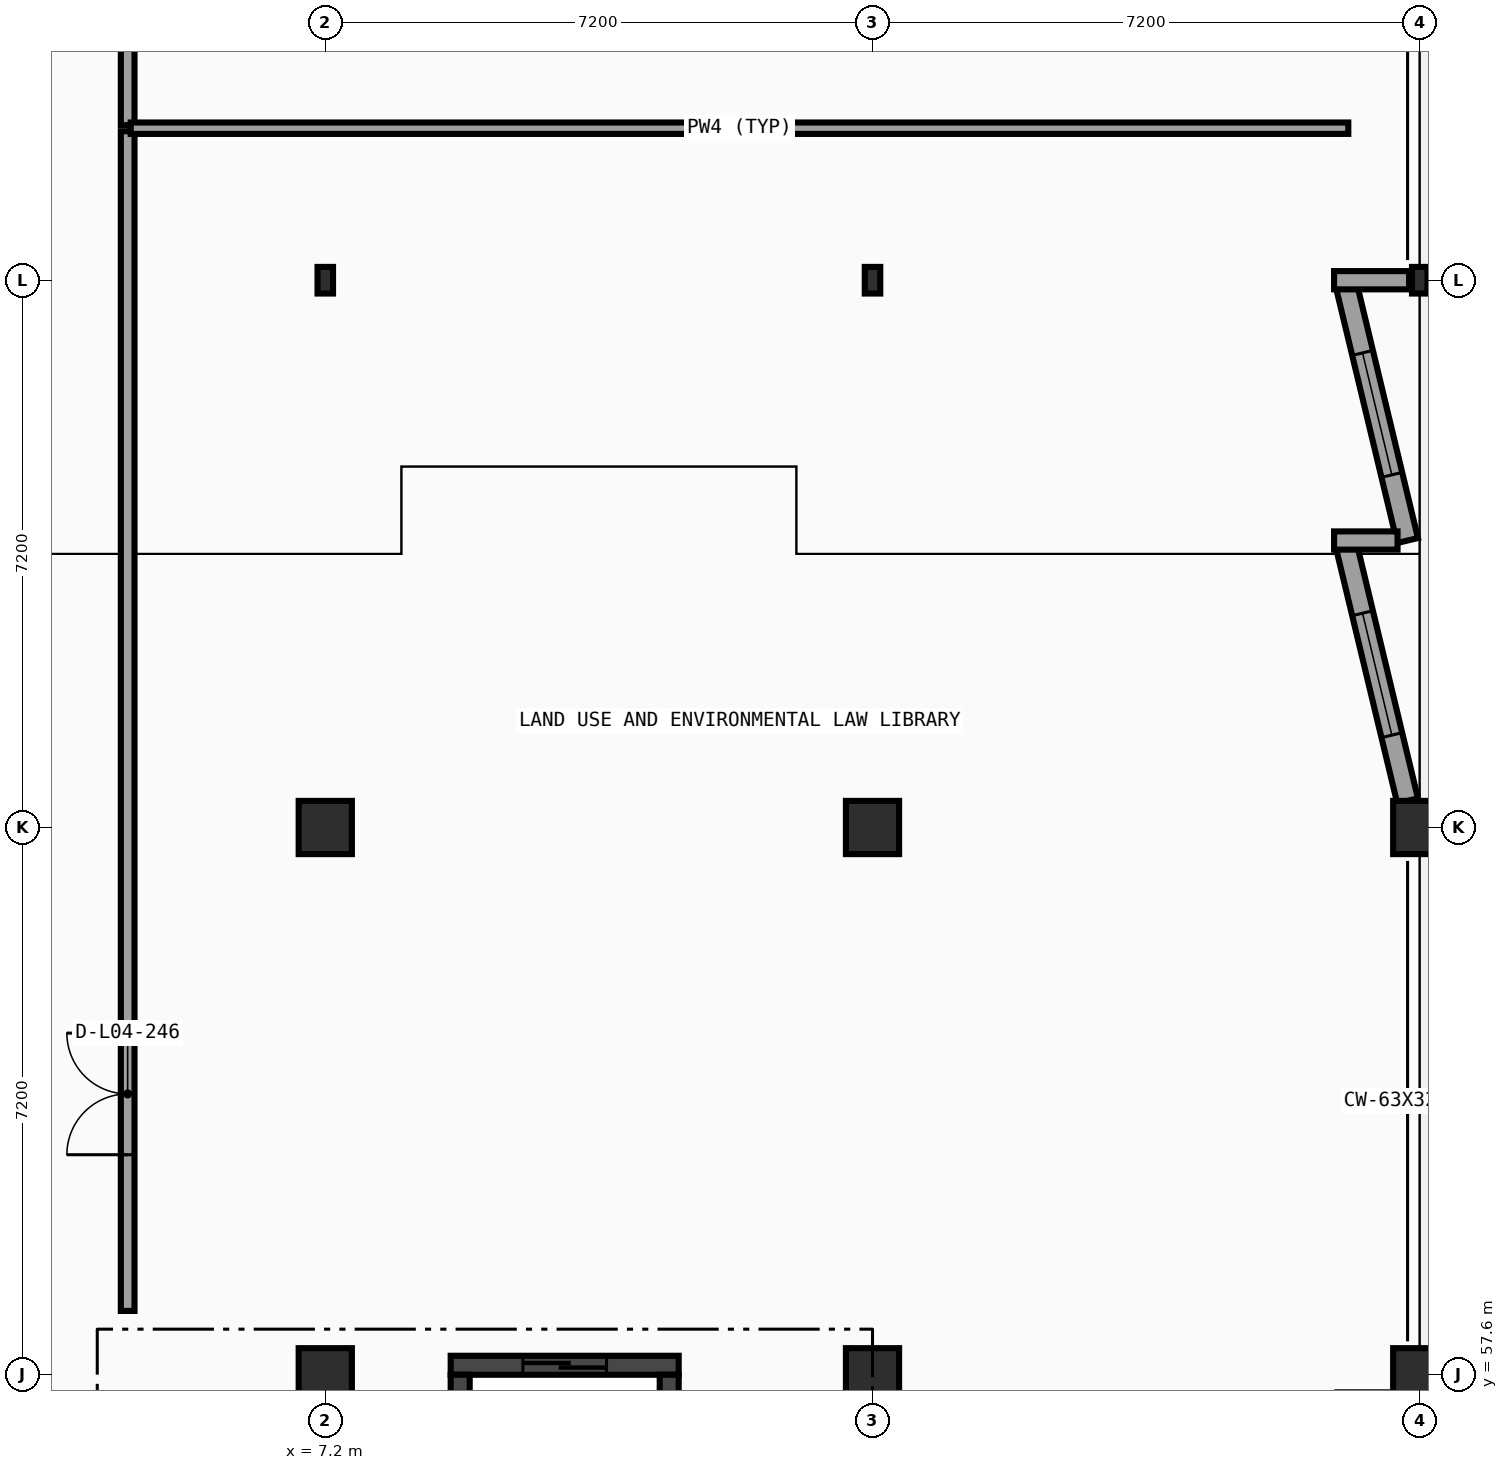
"""IFC4 building model, lengths in metres.
Left out: names, types, materials, properties, quantities, classifications, styles, units other than length and angle.
Written with IfcOpenShell. Run it as: python <this file> out.ifc"""

import sys

from ifc_helpers import new_model, si_unit, direction, frame, frame_2d, origin, origin_2d, place, context, subcontext, project, spatial, rectangle, i_section, extrude, element, fill, save


model = new_model("IFC4")
c1 = context("Model", 3, precision=1e-05, world=origin(), true_north=direction((0.0, 1.0)))
c2 = subcontext(c1, "Body", "Model", "MODEL_VIEW")
j1 = project(units=[si_unit("LENGTHUNIT", "METRE"), si_unit("PLANEANGLEUNIT", "RADIAN")], contexts=[c1])
p1 = place(None, origin())
s1 = spatial("IfcSite", under=j1, at=p1, CompositionType="ELEMENT")
p2 = place(p1, origin())
s2 = spatial("IfcBuilding", under=s1, at=p2, CompositionType="ELEMENT")
p3 = place(p2, frame((0.0, 0.0, 18.9)))
s3 = spatial("IfcBuildingStorey", under=s2, at=p3, CompositionType="ELEMENT", Elevation=18.9)
for number, where, z_axis, x_axis in (
    (1, (7.2, 57.6, 0.0), (0.0, 0.0, 1.0), (1.0, 0.0, 0.0)),
    (2, (7.2, 64.8, 0.0), (0.0, 0.0, 1.0), (1.0, 0.0, 0.0)),
):
    element("IfcColumn", number, at=place(p3, frame(where, z_axis=z_axis, x_axis=x_axis)), inside=s3, PredefinedType="COLUMN", context=c2, shape_type="SweptSolid", body=[
        extrude(rectangle(XDim=0.7, YDim=0.7, at=origin_2d()), origin(), (0.0, 0.0, 1.0), 4.05),
    ])
p4 = place(p3, frame((7.2, 72.0, 0.0), z_axis=(0.0, 0.0, 1.0), x_axis=(1.0, 0.0, 0.0)))
e3 = element("IfcColumn", 3, at=p4, inside=s3, PredefinedType="COLUMN", context=c2, shape_type="SweptSolid", body=[
    extrude(i_section(OverallWidth=0.204, OverallDepth=0.35, WebThickness=0.009, FlangeThickness=0.015, FilletRadius=0.015, at=origin_2d()), origin(), (0.0, 0.0, 1.0), 4.05),
])
for number, where, z_axis, x_axis in (
    (4, (14.4, 57.6, 0.0), (0.0, 0.0, 1.0), (1.0, 0.0, 0.0)),
    (5, (14.4, 64.8, 0.0), (0.0, 0.0, 1.0), (1.0, 0.0, 0.0)),
):
    element("IfcColumn", number, at=place(p3, frame(where, z_axis=z_axis, x_axis=x_axis)), inside=s3, PredefinedType="COLUMN", context=c2, shape_type="SweptSolid", body=[
        extrude(rectangle(XDim=0.7, YDim=0.7, at=origin_2d()), origin(), (0.0, 0.0, 1.0), 4.05),
    ])
p5 = place(p3, frame((14.4, 72.0, 0.0), z_axis=(0.0, 0.0, 1.0), x_axis=(1.0, 0.0, 0.0)))
e6 = element("IfcColumn", 6, at=p5, inside=s3, PredefinedType="COLUMN", context=c2, shape_type="SweptSolid", body=[
    extrude(i_section(OverallWidth=0.204, OverallDepth=0.35, WebThickness=0.009, FlangeThickness=0.015, FilletRadius=0.015, at=origin_2d()), origin(), (0.0, 0.0, 1.0), 4.05),
])
for number, where, z_axis, x_axis in (
    (7, (21.6, 57.6, 0.0), (0.0, 0.0, 1.0), (1.0, 0.0, 0.0)),
    (8, (21.6, 64.8, 0.0), (0.0, 0.0, 1.0), (1.0, 0.0, 0.0)),
):
    element("IfcColumn", number, at=place(p3, frame(where, z_axis=z_axis, x_axis=x_axis)), inside=s3, PredefinedType="COLUMN", context=c2, shape_type="SweptSolid", body=[
        extrude(rectangle(XDim=0.7, YDim=0.7, at=origin_2d()), origin(), (0.0, 0.0, 1.0), 4.05),
    ])
p6 = place(p3, frame((21.6, 72.0, 0.0), z_axis=(0.0, 0.0, 1.0), x_axis=(1.0, 0.0, 0.0)))
e9 = element("IfcColumn", 9, at=p6, inside=s3, PredefinedType="COLUMN", context=c2, shape_type="SweptSolid", body=[
    extrude(i_section(OverallWidth=0.204, OverallDepth=0.35, WebThickness=0.009, FlangeThickness=0.015, FilletRadius=0.015, at=origin_2d()), origin(), (0.0, 0.0, 1.0), 4.05),
])
p7 = place(p3, frame((20.64, 71.908, 0.0), z_axis=(0.0, 0.0, 1.0), x_axis=(0.233389119334, -0.972383421792, 0.0)))
e10 = element("IfcWall", 10, at=p7, inside=s3, PredefinedType="SOLIDWALL", context=c2, shape_type="SweptSolid", body=[
    extrude(rectangle(XDim=3.427, YDim=0.28, at=frame_2d((1.713, 0.0))), origin(), (0.0, 0.0, 1.0), 3.208),
])
p8 = place(p7, frame((0.888, 0.0, 0.8)))
e11 = element("IfcOpeningElement", 11, at=p8, cuts=e10, PredefinedType="OPENING", context=c2, shape_type="SweptSolid", body=[
    extrude(rectangle(XDim=1.65, YDim=1.9, at=frame_2d((0.825, 0.95))), frame((0.0, 0.15, 0.0), z_axis=(0.0, -1.0, 0.0), x_axis=(1.0, 0.0, 0.0)), (0.0, 0.0, 1.0), 0.3),
])
p9 = place(p3, frame((20.473, 72.0, 0.0), z_axis=(0.0, 0.0, 1.0), x_axis=(1.0, 0.0, 0.0)))
e12 = element("IfcWall", 12, at=p9, inside=s3, PredefinedType="SOLIDWALL", context=c2, shape_type="SweptSolid", body=[
    extrude(rectangle(XDim=0.987, YDim=0.24, at=frame_2d((0.494, 0.0))), origin(), (0.0, 0.0, 1.0), 3.208),
])
p10 = place(p3, frame((20.64, 68.483, 0.0), z_axis=(0.0, 0.0, 1.0), x_axis=(0.233389119334, -0.972383421792, 0.0)))
e13 = element("IfcWall", 13, at=p10, inside=s3, PredefinedType="SOLIDWALL", context=c2, shape_type="SweptSolid", body=[
    extrude(rectangle(XDim=3.427, YDim=0.28, at=frame_2d((1.713, 0.0))), origin(), (0.0, 0.0, 1.0), 3.216),
])
p11 = place(p10, frame((0.888, 0.0, 0.8)))
e14 = element("IfcOpeningElement", 14, at=p11, cuts=e13, PredefinedType="OPENING", context=c2, shape_type="SweptSolid", body=[
    extrude(rectangle(XDim=1.65, YDim=1.9, at=frame_2d((0.825, 0.95))), frame((0.0, 0.15, 0.0), z_axis=(0.0, -1.0, 0.0), x_axis=(1.0, 0.0, 0.0)), (0.0, 0.0, 1.0), 0.3),
])
p12 = place(p3, frame((20.473, 68.575, 0.0), z_axis=(0.0, 0.0, 1.0), x_axis=(1.0, 0.0, 0.0)))
e15 = element("IfcWall", 15, at=p12, inside=s3, PredefinedType="SOLIDWALL", context=c2, shape_type="SweptSolid", body=[
    extrude(rectangle(XDim=0.835, YDim=0.24, at=frame_2d((0.417, 0.0))), origin(), (0.0, 0.0, 1.0), 3.8),
])
p13 = place(p3, frame((11.85, 57.725, 0.0), z_axis=(0.0, 0.0, 1.0), x_axis=(-1.0, 0.0, 0.0)))
e16 = element("IfcWall", 16, at=p13, inside=s3, PredefinedType="SHEAR", context=c2, shape_type="SweptSolid", body=[
    extrude(rectangle(XDim=3.0, YDim=0.25, at=frame_2d((1.5, 0.0))), origin(), (0.0, 0.0, 1.0), 3.8),
])
p14 = place(p13, frame((0.95, 0.0, 0.0)))
e17 = element("IfcOpeningElement", 17, at=p14, cuts=e16, PredefinedType="OPENING", context=c2, shape_type="SweptSolid", body=[
    extrude(rectangle(XDim=1.1, YDim=2.1, at=frame_2d((0.55, 1.05))), frame((0.0, 0.135, 0.0), z_axis=(0.0, -1.0, 0.0), x_axis=(1.0, 0.0, 0.0)), (0.0, 0.0, 1.0), 0.27),
])
for number, where, z_axis, x_axis in (
    (18, (8.975, 57.6, 0.0), (0.0, 0.0, 1.0), (0.0, -1.0, 0.0)),
    (19, (11.725, 55.3, 0.0), (0.0, 0.0, 1.0), (0.0, 1.0, 0.0)),
):
    element("IfcWall", number, at=place(p3, frame(where, z_axis=z_axis, x_axis=x_axis)), inside=s3, PredefinedType="SHEAR", context=c2, shape_type="SweptSolid", body=[
        extrude(rectangle(XDim=2.3, YDim=0.25, at=frame_2d((1.15, 0.0))), origin(), (0.0, 0.0, 1.0), 3.8),
    ])
p15 = place(p3, frame((4.6, 58.44, 0.0), z_axis=(0.0, 0.0, 1.0), x_axis=(0.0, 1.0, 0.0)))
e20 = element("IfcWall", 20, at=p15, inside=s3, PredefinedType="PARTITIONING", context=c2, shape_type="SweptSolid", body=[
    extrude(rectangle(XDim=15.52, YDim=0.18, at=frame_2d((7.76, 0.0))), origin(), (0.0, 0.0, 1.0), 3.208),
])
p16 = place(p15, frame((2.055, 0.0, 0.0)))
e21 = element("IfcOpeningElement", 21, at=p16, cuts=e20, PredefinedType="OPENING", context=c2, shape_type="SweptSolid", body=[
    extrude(rectangle(XDim=1.6, YDim=2.1, at=frame_2d((0.8, 1.05))), frame((0.0, 0.1, 0.0), z_axis=(0.0, -1.0, 0.0), x_axis=(1.0, 0.0, 0.0)), (0.0, 0.0, 1.0), 0.2),
])
p17 = place(p3, frame((4.6, 74.04, 0.0), z_axis=(0.0, 0.0, 1.0), x_axis=(0.0, 1.0, 0.0)))
e22 = element("IfcWall", 22, at=p17, inside=s3, PredefinedType="PARTITIONING", context=c2, shape_type="SweptSolid", body=[
    extrude(rectangle(XDim=12.32, YDim=0.18, at=frame_2d((6.16, 0.0))), origin(), (0.0, 0.0, 1.0), 3.208),
])
p18 = place(p17, frame((7.905, 0.0, 0.0)))
e23 = element("IfcOpeningElement", 23, at=p18, cuts=e22, PredefinedType="OPENING", context=c2, shape_type="SweptSolid", body=[
    extrude(rectangle(XDim=1.5, YDim=2.1, at=frame_2d((0.75, 1.05))), frame((0.0, 0.1, 0.0), z_axis=(0.0, -1.0, 0.0), x_axis=(1.0, 0.0, 0.0)), (0.0, 0.0, 1.0), 0.2),
])
p19 = place(p3, frame((4.64, 74.0, 0.0), z_axis=(0.0, 0.0, 1.0), x_axis=(1.0, 0.0, 0.0)))
e24 = element("IfcWall", 24, at=p19, inside=s3, PredefinedType="PARTITIONING", context=c2, shape_type="SweptSolid", body=[
    extrude(rectangle(XDim=16.02, YDim=0.15, at=frame_2d((8.01, 0.0))), origin(), (0.0, 0.0, 1.0), 3.206),
])
p20 = place(p8, origin())
e25 = element("IfcWindow", 25, at=p20, inside=s3, PartitioningType="SINGLE_PANEL", PredefinedType="WINDOW", context=c2, shape_type="SweptSolid", body=[
    extrude(rectangle(XDim=1.65, YDim=1.9, at=frame_2d((0.825, 0.95))), frame((0.0, 0.03, 0.0), z_axis=(0.0, -1.0, 0.0), x_axis=(1.0, 0.0, 0.0)), (0.0, 0.0, 1.0), 0.06),
])
fill(e11, e25)
p21 = place(p11, origin())
e26 = element("IfcWindow", 26, at=p21, inside=s3, PartitioningType="SINGLE_PANEL", PredefinedType="WINDOW", context=c2, shape_type="SweptSolid", body=[
    extrude(rectangle(XDim=1.65, YDim=1.9, at=frame_2d((0.825, 0.95))), frame((0.0, 0.03, 0.0), z_axis=(0.0, -1.0, 0.0), x_axis=(1.0, 0.0, 0.0)), (0.0, 0.0, 1.0), 0.06),
])
fill(e14, e26)
p22 = place(p14, origin())
e27 = element("IfcDoor", 27, at=p22, inside=s3, OperationType="SLIDING_TO_LEFT", PredefinedType="DOOR", context=c2, shape_type="SweptSolid", body=[
    extrude(rectangle(XDim=1.1, YDim=2.1, at=frame_2d((0.55, 1.05))), frame((0.0, 0.025, 0.0), z_axis=(0.0, -1.0, 0.0), x_axis=(1.0, 0.0, 0.0)), (0.0, 0.0, 1.0), 0.05),
])
fill(e17, e27)
p23 = place(p16, origin())
e28 = element("IfcDoor", 28, at=p23, inside=s3, OperationType="DOUBLE_DOOR_SINGLE_SWING", PredefinedType="DOOR", context=c2, shape_type="SweptSolid", body=[
    extrude(rectangle(XDim=1.6, YDim=2.1, at=frame_2d((0.8, 1.05))), frame((0.0, 0.025, 0.0), z_axis=(0.0, -1.0, 0.0), x_axis=(1.0, 0.0, 0.0)), (0.0, 0.0, 1.0), 0.05),
])
fill(e21, e28)
save(model, sys.argv[1])
